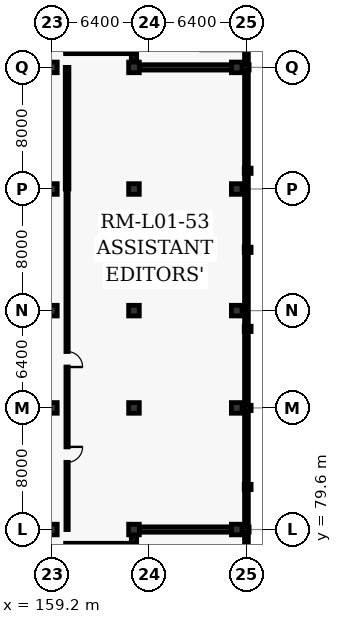
"""IFC4 building model, lengths in metres.
Left out: names, types, materials, properties, quantities, classifications, styles, units other than length and angle.
Written with IfcOpenShell. Run it as: python <this file> out.ifc"""

import sys

from ifc_helpers import new_model, si_unit, direction, frame, frame_2d, origin, origin_2d, place, context, subcontext, project, spatial, rectangle, extrude, element, fill, save


model = new_model("IFC4")
c1 = context("Model", 3, precision=1e-05, world=origin(), true_north=direction((0.0, 1.0)))
c2 = subcontext(c1, "Body", "Model", "MODEL_VIEW")
j1 = project(units=[si_unit("LENGTHUNIT", "METRE"), si_unit("PLANEANGLEUNIT", "RADIAN")], contexts=[c1])
p1 = place(None, origin())
s1 = spatial("IfcSite", under=j1, at=p1, CompositionType="ELEMENT")
p2 = place(p1, origin())
s2 = spatial("IfcBuilding", under=s1, at=p2, CompositionType="ELEMENT")
p3 = place(p2, frame((0.0, 0.0, 5.4)))
s3 = spatial("IfcBuildingStorey", under=s2, at=p3, CompositionType="ELEMENT", Elevation=5.4)
for number, where, z_axis, x_axis in (
    (1, (159.2, 79.6, 0.0), (0.0, 0.0, 1.0), (1.0, 0.0, 0.0)),
    (2, (159.2, 87.6, 0.0), (0.0, 0.0, 1.0), (1.0, 0.0, 0.0)),
    (3, (159.2, 94.0, 0.0), (0.0, 0.0, 1.0), (1.0, 0.0, 0.0)),
    (4, (159.2, 102.0, 0.0), (0.0, 0.0, 1.0), (1.0, 0.0, 0.0)),
    (5, (159.2, 110.0, 0.0), (0.0, 0.0, 1.0), (1.0, 0.0, 0.0)),
    (6, (164.6, 79.6, 0.0), (0.0, 0.0, 1.0), (1.0, 0.0, 0.0)),
    (7, (164.6, 87.6, 0.0), (0.0, 0.0, 1.0), (1.0, 0.0, 0.0)),
    (8, (164.6, 94.0, 0.0), (0.0, 0.0, 1.0), (1.0, 0.0, 0.0)),
    (9, (164.6, 102.0, 0.0), (0.0, 0.0, 1.0), (1.0, 0.0, 0.0)),
    (10, (164.6, 110.0, 0.0), (0.0, 0.0, 1.0), (1.0, 0.0, 0.0)),
    (11, (171.36, 79.6, 0.0), (0.0, 0.0, 1.0), (1.0, 0.0, 0.0)),
    (12, (171.36, 87.6, 0.0), (0.0, 0.0, 1.0), (1.0, 0.0, 0.0)),
    (13, (171.36, 94.0, 0.0), (0.0, 0.0, 1.0), (1.0, 0.0, 0.0)),
    (14, (171.36, 102.0, 0.0), (0.0, 0.0, 1.0), (1.0, 0.0, 0.0)),
    (15, (171.36, 110.0, 0.0), (0.0, 0.0, 1.0), (1.0, 0.0, 0.0)),
):
    element("IfcColumn", number, at=place(p3, frame(where, z_axis=z_axis, x_axis=x_axis)), inside=s3, PredefinedType="COLUMN", context=c2, shape_type="SweptSolid", body=[
        extrude(rectangle(XDim=0.7, YDim=0.7, at=origin_2d()), origin(), (0.0, 0.0, 1.0), 4.8),
    ])
for number, where, z_axis, x_axis in (
    (16, (172.08, 82.4, 0.0), (0.0, 0.0, 1.0), (1.0, 0.0, 0.0)),
    (17, (172.08, 87.6, 0.0), (0.0, 0.0, 1.0), (1.0, 0.0, 0.0)),
    (18, (172.08, 92.8, 0.0), (0.0, 0.0, 1.0), (1.0, 0.0, 0.0)),
    (19, (172.08, 98.0, 0.0), (0.0, 0.0, 1.0), (1.0, 0.0, 0.0)),
    (20, (172.08, 103.2, 0.0), (0.0, 0.0, 1.0), (1.0, 0.0, 0.0)),
):
    element("IfcColumn", number, at=place(p3, frame(where, z_axis=z_axis, x_axis=x_axis)), inside=s3, PredefinedType="PILASTER", context=c2, shape_type="SweptSolid", body=[
        extrude(rectangle(XDim=0.35, YDim=0.45, at=origin_2d()), origin(), (0.0, 0.0, 1.0), 4.8),
    ])
p4 = place(p3, frame((172.0, 117.86, 0.0), z_axis=(0.0, 0.0, 1.0), x_axis=(0.0, -1.0, 0.0)))
e21 = element("IfcWall", 21, at=p4, inside=s3, PredefinedType="SOLIDWALL", context=c2, shape_type="SweptSolid", body=[
    extrude(rectangle(XDim=46.12, YDim=0.25, at=frame_2d((23.06, 0.0))), origin(), (0.0, 0.0, 1.0), 4.55),
])
p5 = place(p3, frame((164.952, 79.6, 0.0), z_axis=(0.0, 0.0, 1.0), x_axis=(1.0, 0.0, 0.0)))
e22 = element("IfcWall", 22, at=p5, inside=s3, PredefinedType="SHEAR", context=c2, shape_type="SweptSolid", body=[
    extrude(rectangle(XDim=7.223, YDim=0.35, at=frame_2d((3.612, 0.0))), origin(), (0.0, 0.0, 1.0), 4.55),
])
p6 = place(p3, frame((164.6, 71.775, 0.0), z_axis=(0.0, 0.0, 1.0), x_axis=(0.0, 1.0, 0.0)))
e23 = element("IfcWall", 23, at=p6, inside=s3, PredefinedType="SHEAR", context=c2, shape_type="SweptSolid", body=[
    extrude(rectangle(XDim=7.473, YDim=0.35, at=frame_2d((3.737, 0.0))), origin(), (0.0, 0.0, 1.0), 4.55),
])
p7 = place(p6, frame((1.075, 0.0, 0.0)))
e24 = element("IfcOpeningElement", 24, at=p7, cuts=e23, PredefinedType="OPENING", context=c2, shape_type="SweptSolid", body=[
    extrude(rectangle(XDim=1.1, YDim=2.15, at=frame_2d((0.55, 1.075))), frame((0.0, 0.185, 0.0), z_axis=(0.0, -1.0, 0.0), x_axis=(1.0, 0.0, 0.0)), (0.0, 0.0, 1.0), 0.37),
])
p8 = place(p6, frame((5.05, 0.0, 0.0)))
e25 = element("IfcOpeningElement", 25, at=p8, cuts=e23, PredefinedType="OPENING", context=c2, shape_type="SweptSolid", body=[
    extrude(rectangle(XDim=1.15, YDim=2.2, at=frame_2d((0.575, 1.1))), frame((0.0, 0.185, 0.0), z_axis=(0.0, -1.0, 0.0), x_axis=(1.0, 0.0, 0.0)), (0.0, 0.0, 1.0), 0.37),
])
p9 = place(p3, frame((160.105, 78.6, 0.0), z_axis=(0.0, 0.0, 1.0), x_axis=(1.0, 0.0, 0.0)))
e26 = element("IfcWall", 26, at=p9, inside=s3, PredefinedType="PARTITIONING", context=c2, shape_type="SweptSolid", body=[
    extrude(rectangle(XDim=4.495, YDim=0.19, at=frame_2d((2.248, 0.0))), origin(), (0.0, 0.0, 1.0), 4.55),
])
p10 = place(p3, frame((164.952, 110.0, 0.0), z_axis=(0.0, 0.0, 1.0), x_axis=(1.0, 0.0, 0.0)))
e27 = element("IfcWall", 27, at=p10, inside=s3, PredefinedType="SHEAR", context=c2, shape_type="SweptSolid", body=[
    extrude(rectangle(XDim=7.223, YDim=0.35, at=frame_2d((3.612, 0.0))), origin(), (0.0, 0.0, 1.0), 4.55),
])
p11 = place(p3, frame((164.6, 110.352, 0.0), z_axis=(0.0, 0.0, 1.0), x_axis=(0.0, 1.0, 0.0)))
e28 = element("IfcWall", 28, at=p11, inside=s3, PredefinedType="SHEAR", context=c2, shape_type="SweptSolid", body=[
    extrude(rectangle(XDim=7.473, YDim=0.35, at=frame_2d((3.736, 0.0))), origin(), (0.0, 0.0, 1.0), 4.55),
])
p12 = place(p11, frame((5.298, 0.0, 0.0)))
e29 = element("IfcOpeningElement", 29, at=p12, cuts=e28, PredefinedType="OPENING", context=c2, shape_type="SweptSolid", body=[
    extrude(rectangle(XDim=1.1, YDim=2.15, at=frame_2d((0.55, 1.075))), frame((0.0, 0.185, 0.0), z_axis=(0.0, -1.0, 0.0), x_axis=(1.0, 0.0, 0.0)), (0.0, 0.0, 1.0), 0.37),
])
p13 = place(p11, frame((1.273, 0.0, 0.0)))
e30 = element("IfcOpeningElement", 30, at=p13, cuts=e28, PredefinedType="OPENING", context=c2, shape_type="SweptSolid", body=[
    extrude(rectangle(XDim=1.15, YDim=2.2, at=frame_2d((0.575, 1.1))), frame((0.0, 0.185, 0.0), z_axis=(0.0, -1.0, 0.0), x_axis=(1.0, 0.0, 0.0)), (0.0, 0.0, 1.0), 0.37),
])
p14 = place(p3, frame((160.105, 111.0, 0.0), z_axis=(0.0, 0.0, 1.0), x_axis=(1.0, 0.0, 0.0)))
e31 = element("IfcWall", 31, at=p14, inside=s3, PredefinedType="PARTITIONING", context=c2, shape_type="SweptSolid", body=[
    extrude(rectangle(XDim=4.495, YDim=0.19, at=frame_2d((2.248, 0.0))), origin(), (0.0, 0.0, 1.0), 4.55),
])
p15 = place(p3, frame((160.2, 110.0, 0.0), z_axis=(0.0, 0.0, 1.0), x_axis=(0.0, -1.0, 0.0)))
e32 = element("IfcWall", 32, at=p15, inside=s3, PredefinedType="PARTITIONING", context=c2, shape_type="SweptSolid", body=[
    extrude(rectangle(XDim=8.0, YDim=0.24, at=frame_2d((4.0, 0.0))), origin(), (0.0, 0.0, 1.0), 4.55),
])
p16 = place(p3, frame((160.2, 102.0, 0.0), z_axis=(0.0, 0.0, 1.0), x_axis=(0.0, -1.0, 0.0)))
e33 = element("IfcWall", 33, at=p16, inside=s3, PredefinedType="PARTITIONING", context=c2, shape_type="SweptSolid", body=[
    extrude(rectangle(XDim=22.4, YDim=0.15, at=frame_2d((11.2, 0.0))), origin(), (0.0, 0.0, 1.0), 4.55),
])
p17 = place(p16, frame((10.69, 0.0, 0.0)))
e34 = element("IfcOpeningElement", 34, at=p17, cuts=e33, PredefinedType="OPENING", context=c2, shape_type="SweptSolid", body=[
    extrude(rectangle(XDim=1.02, YDim=2.1, at=frame_2d((0.51, 1.05))), frame((0.0, 0.085, 0.0), z_axis=(0.0, -1.0, 0.0), x_axis=(1.0, 0.0, 0.0)), (0.0, 0.0, 1.0), 0.17),
])
p18 = place(p16, frame((16.962, 0.0, 0.0)))
e35 = element("IfcOpeningElement", 35, at=p18, cuts=e33, PredefinedType="OPENING", context=c2, shape_type="SweptSolid", body=[
    extrude(rectangle(XDim=1.02, YDim=2.1, at=frame_2d((0.51, 1.05))), frame((0.0, 0.085, 0.0), z_axis=(0.0, -1.0, 0.0), x_axis=(1.0, 0.0, 0.0)), (0.0, 0.0, 1.0), 0.17),
])
p19 = place(p17, origin())
e36 = element("IfcDoor", 36, at=p19, inside=s3, OperationType="SINGLE_SWING_RIGHT", PredefinedType="DOOR", context=c2, shape_type="SweptSolid", body=[
    extrude(rectangle(XDim=1.02, YDim=2.1, at=frame_2d((0.51, 1.05))), frame((0.0, 0.025, 0.0), z_axis=(0.0, -1.0, 0.0), x_axis=(1.0, 0.0, 0.0)), (0.0, 0.0, 1.0), 0.05),
])
fill(e34, e36)
p20 = place(p18, origin())
e37 = element("IfcDoor", 37, at=p20, inside=s3, OperationType="SINGLE_SWING_LEFT", PredefinedType="DOOR", context=c2, shape_type="SweptSolid", body=[
    extrude(rectangle(XDim=1.02, YDim=2.1, at=frame_2d((0.51, 1.05))), frame((0.0, 0.025, 0.0), z_axis=(0.0, -1.0, 0.0), x_axis=(1.0, 0.0, 0.0)), (0.0, 0.0, 1.0), 0.05),
])
fill(e35, e37)
save(model, sys.argv[1])
